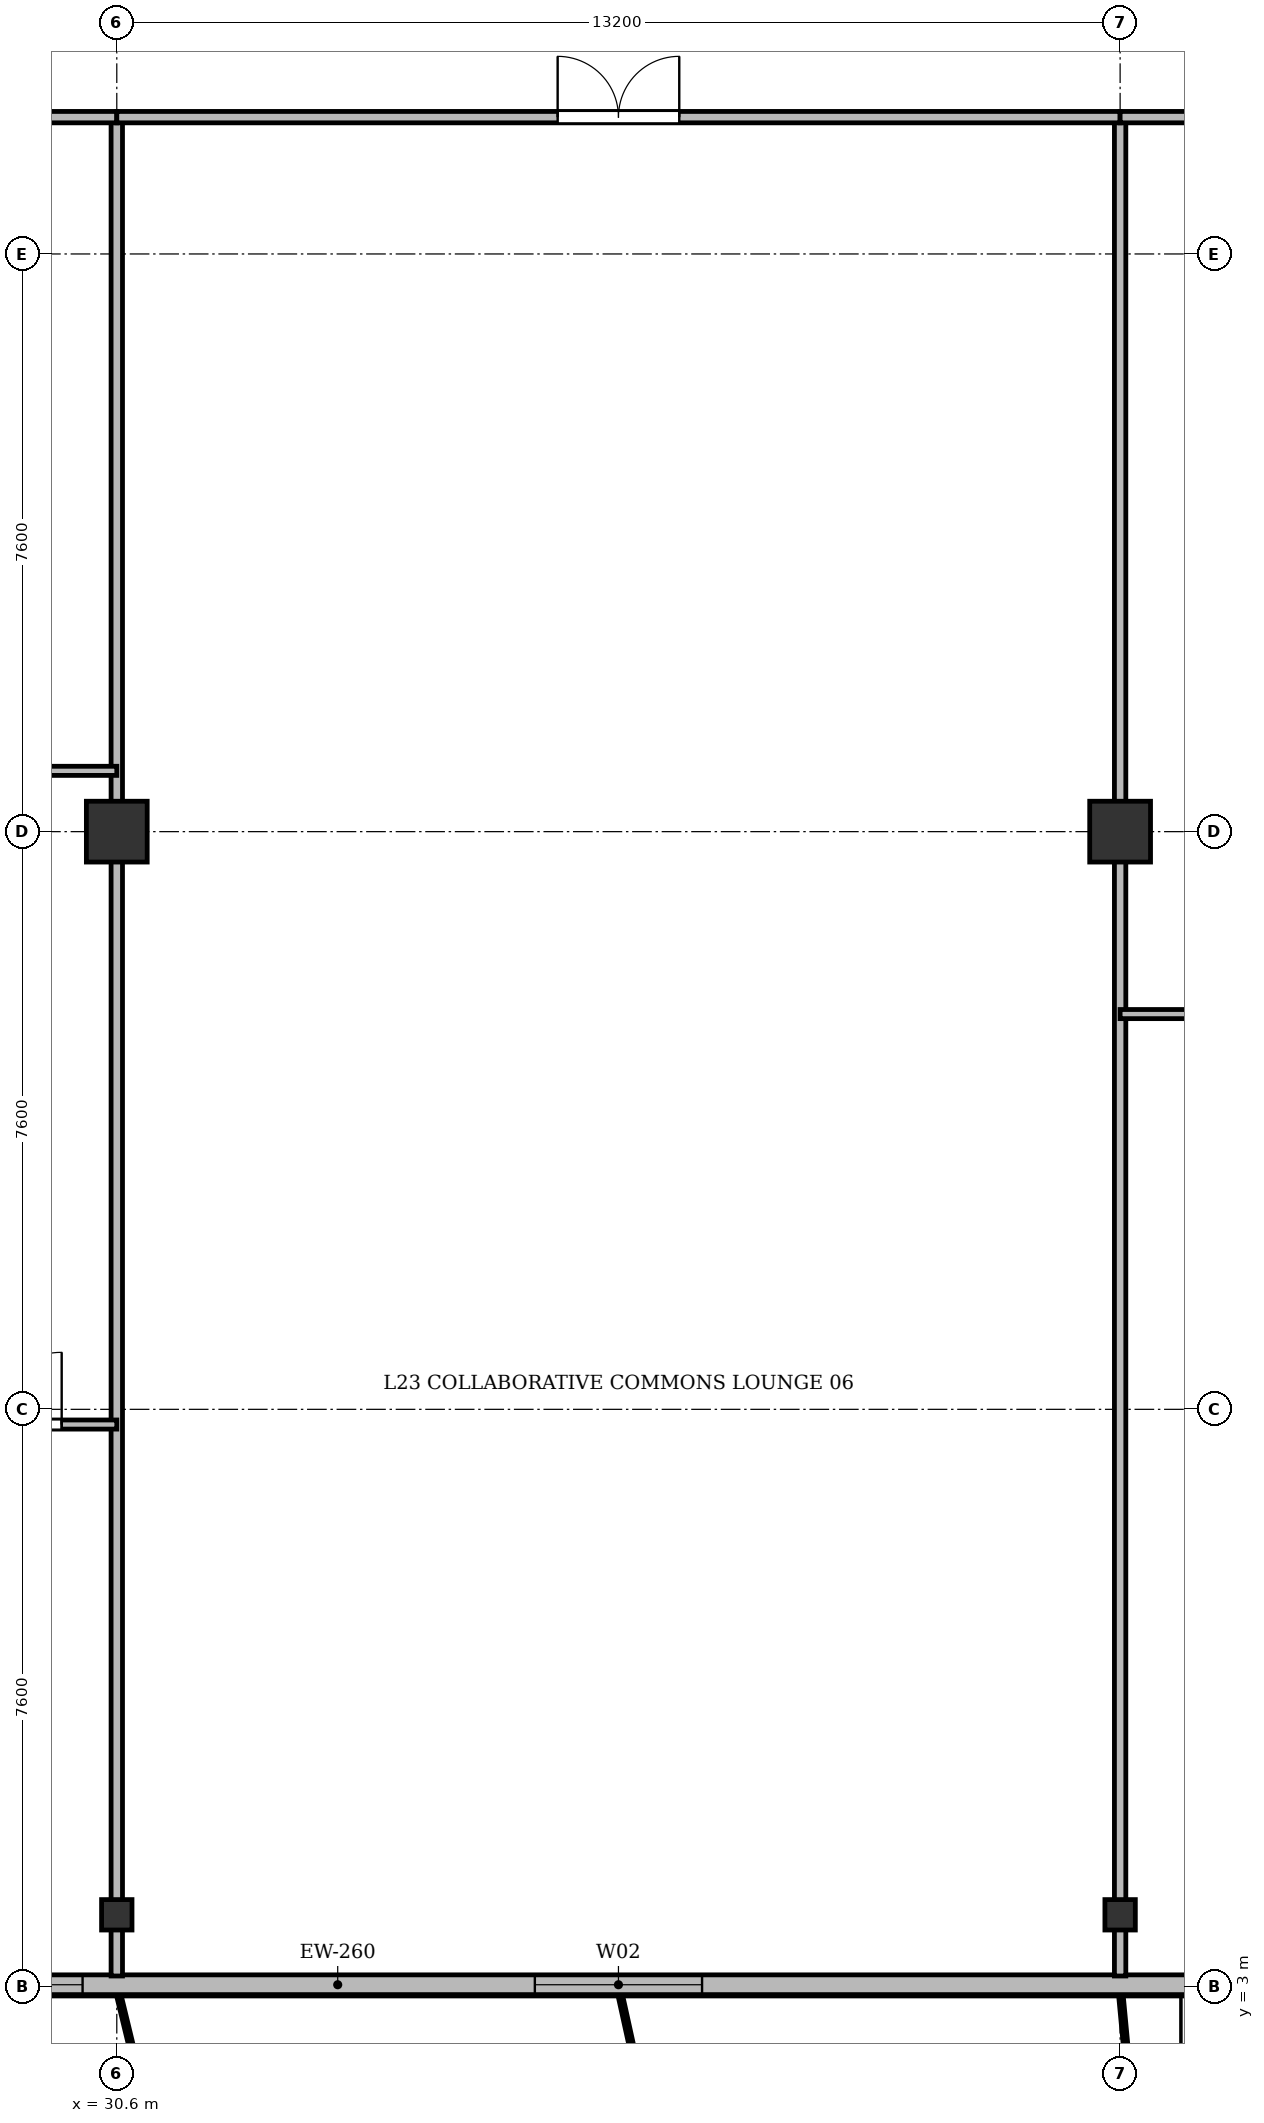
"""IFC4 building model, lengths in metres.
Left out: names, types, materials, properties, quantities, classifications, styles, units other than length and angle.
Written with IfcOpenShell. Run it as: python <this file> out.ifc"""

import sys

from ifc_helpers import new_model, si_unit, direction, frame, frame_2d, origin, origin_2d, place, context, subcontext, project, spatial, rectangle, i_section, extrude, source, transform, mapped, element, fill, save


model = new_model("IFC4")
c1 = context("Model", 3, precision=1e-05, world=origin(), true_north=direction((0.0, 1.0)))
c2 = subcontext(c1, "Body", "Model", "MODEL_VIEW")
j1 = project(units=[si_unit("LENGTHUNIT", "METRE"), si_unit("PLANEANGLEUNIT", "RADIAN")], contexts=[c1])
p1 = place(None, origin())
s1 = spatial("IfcSite", under=j1, at=p1, CompositionType="ELEMENT")
p2 = place(p1, origin())
s2 = spatial("IfcBuilding", under=s1, at=p2, CompositionType="ELEMENT")
p3 = place(p2, frame((0.0, 0.0, 92.5)))
s3 = spatial("IfcBuildingStorey", under=s2, at=p3, CompositionType="ELEMENT", Elevation=92.5)
m1 = source(origin(), c2, "Body", "SweptSolid", [
    extrude(i_section(OverallWidth=0.4, OverallDepth=0.4, WebThickness=0.022, FlangeThickness=0.035, at=origin_2d()), origin(), (0.0, 0.0, 1.0), 3.6),
])
p4 = place(p3, frame((30.6, 3.95, 0.0), z_axis=(0.0, 0.0, 1.0), x_axis=(1.0, 0.0, 0.0)))
e1 = element("IfcColumn", 1, at=p4, inside=s3, PredefinedType="COLUMN", context=c2, shape_type="MappedRepresentation", body=[
    mapped(m1, transform((0.0, 0.0, 0.0), x_axis=(1.0, 0.0, 0.0), y_axis=(0.0, 1.0, 0.0), z_axis=(0.0, 0.0, 1.0), scale=1.0)),
])
m2 = source(origin(), c2, "Body", "SweptSolid", [
    extrude(rectangle(XDim=0.8, YDim=0.8, at=origin_2d()), origin(), (0.0, 0.0, 1.0), 3.6),
])
p5 = place(p3, frame((30.6, 18.2, 0.0), z_axis=(0.0, 0.0, 1.0), x_axis=(1.0, 0.0, 0.0)))
e2 = element("IfcColumn", 2, at=p5, inside=s3, PredefinedType="COLUMN", context=c2, shape_type="MappedRepresentation", body=[
    mapped(m2, transform((0.0, 0.0, 0.0), x_axis=(1.0, 0.0, 0.0), y_axis=(0.0, 1.0, 0.0), z_axis=(0.0, 0.0, 1.0), scale=1.0)),
])
p6 = place(p3, frame((43.8, 3.95, 0.0), z_axis=(0.0, 0.0, 1.0), x_axis=(1.0, 0.0, 0.0)))
e3 = element("IfcColumn", 3, at=p6, inside=s3, PredefinedType="COLUMN", context=c2, shape_type="MappedRepresentation", body=[
    mapped(m1, transform((0.0, 0.0, 0.0), x_axis=(1.0, 0.0, 0.0), y_axis=(0.0, 1.0, 0.0), z_axis=(0.0, 0.0, 1.0), scale=1.0)),
])
p7 = place(p3, frame((43.8, 18.2, 0.0), z_axis=(0.0, 0.0, 1.0), x_axis=(1.0, 0.0, 0.0)))
e4 = element("IfcColumn", 4, at=p7, inside=s3, PredefinedType="COLUMN", context=c2, shape_type="MappedRepresentation", body=[
    mapped(m2, transform((0.0, 0.0, 0.0), x_axis=(1.0, 0.0, 0.0), y_axis=(0.0, 1.0, 0.0), z_axis=(0.0, 0.0, 1.0), scale=1.0)),
])
p8 = place(p3, frame((66.9, 3.03, 0.0), z_axis=(0.0, 0.0, 1.0), x_axis=(-1.0, 0.0, 0.0)))
e5 = element("IfcWall", 5, at=p8, inside=s3, PredefinedType="SOLIDWALL", context=c2, shape_type="SweptSolid", body=[
    extrude(rectangle(XDim=59.4, YDim=0.26, at=frame_2d((29.7, 0.0))), origin(), (0.0, 0.0, 1.0), 3.34),
])
p9 = place(p8, frame((2.175, 0.0, 0.9)))
e6 = element("IfcOpeningElement", 6, at=p9, cuts=e5, PredefinedType="OPENING", context=c2, shape_type="SweptSolid", body=[
    extrude(rectangle(XDim=1.65, YDim=1.85, at=frame_2d((0.825, 0.925))), frame((0.0, 0.14, 0.0), z_axis=(0.0, -1.0, 0.0), x_axis=(1.0, 0.0, 0.0)), (0.0, 0.0, 1.0), 0.28),
])
p10 = place(p8, frame((5.5, 0.0, 0.9)))
e7 = element("IfcOpeningElement", 7, at=p10, cuts=e5, PredefinedType="OPENING", context=c2, shape_type="SweptSolid", body=[
    extrude(rectangle(XDim=1.8, YDim=1.8, at=frame_2d((0.9, 0.9))), frame((0.0, 0.14, 0.0), z_axis=(0.0, -1.0, 0.0), x_axis=(1.0, 0.0, 0.0)), (0.0, 0.0, 1.0), 0.28),
])
p11 = place(p8, frame((8.65, 0.0, 0.9)))
e8 = element("IfcOpeningElement", 8, at=p11, cuts=e5, PredefinedType="OPENING", context=c2, shape_type="SweptSolid", body=[
    extrude(rectangle(XDim=1.5, YDim=1.75, at=frame_2d((0.75, 0.875))), frame((0.0, 0.14, 0.0), z_axis=(0.0, -1.0, 0.0), x_axis=(1.0, 0.0, 0.0)), (0.0, 0.0, 1.0), 0.28),
])
p12 = place(p8, frame((11.25, 0.0, 0.9)))
e9 = element("IfcOpeningElement", 9, at=p12, cuts=e5, PredefinedType="OPENING", context=c2, shape_type="SweptSolid", body=[
    extrude(rectangle(XDim=1.5, YDim=1.75, at=frame_2d((0.75, 0.875))), frame((0.0, 0.14, 0.0), z_axis=(0.0, -1.0, 0.0), x_axis=(1.0, 0.0, 0.0)), (0.0, 0.0, 1.0), 0.28),
])
p13 = place(p8, frame((13.6, 0.0, 0.9)))
e10 = element("IfcOpeningElement", 10, at=p13, cuts=e5, PredefinedType="OPENING", context=c2, shape_type="SweptSolid", body=[
    extrude(rectangle(XDim=2.0, YDim=1.95, at=frame_2d((1.0, 0.975))), frame((0.0, 0.14, 0.0), z_axis=(0.0, -1.0, 0.0), x_axis=(1.0, 0.0, 0.0)), (0.0, 0.0, 1.0), 0.28),
])
p14 = place(p8, frame((16.775, 0.0, 0.9)))
e11 = element("IfcOpeningElement", 11, at=p14, cuts=e5, PredefinedType="OPENING", context=c2, shape_type="SweptSolid", body=[
    extrude(rectangle(XDim=1.65, YDim=1.85, at=frame_2d((0.825, 0.925))), frame((0.0, 0.14, 0.0), z_axis=(0.0, -1.0, 0.0), x_axis=(1.0, 0.0, 0.0)), (0.0, 0.0, 1.0), 0.28),
])
p15 = place(p8, frame((20.227, 0.0, 0.0)))
e12 = element("IfcOpeningElement", 12, at=p15, cuts=e5, PredefinedType="OPENING", context=c2, shape_type="SweptSolid", body=[
    extrude(rectangle(XDim=1.2, YDim=2.2, at=frame_2d((0.6, 1.1))), frame((0.0, 0.14, 0.0), z_axis=(0.0, -1.0, 0.0), x_axis=(1.0, 0.0, 0.0)), (0.0, 0.0, 1.0), 0.28),
])
p16 = place(p8, frame((28.6, 0.0, 0.9)))
e13 = element("IfcOpeningElement", 13, at=p16, cuts=e5, PredefinedType="OPENING", context=c2, shape_type="SweptSolid", body=[
    extrude(rectangle(XDim=2.2, YDim=1.8, at=frame_2d((1.1, 0.9))), frame((0.0, 0.14, 0.0), z_axis=(0.0, -1.0, 0.0), x_axis=(1.0, 0.0, 0.0)), (0.0, 0.0, 1.0), 0.28),
])
p17 = place(p8, frame((36.75, 0.0, 0.9)))
e14 = element("IfcOpeningElement", 14, at=p17, cuts=e5, PredefinedType="OPENING", context=c2, shape_type="SweptSolid", body=[
    extrude(rectangle(XDim=1.5, YDim=1.75, at=frame_2d((0.75, 0.875))), frame((0.0, 0.14, 0.0), z_axis=(0.0, -1.0, 0.0), x_axis=(1.0, 0.0, 0.0)), (0.0, 0.0, 1.0), 0.28),
])
p18 = place(p8, frame((39.15, 0.0, 0.9)))
e15 = element("IfcOpeningElement", 15, at=p18, cuts=e5, PredefinedType="OPENING", context=c2, shape_type="SweptSolid", body=[
    extrude(rectangle(XDim=1.5, YDim=1.75, at=frame_2d((0.75, 0.875))), frame((0.0, 0.14, 0.0), z_axis=(0.0, -1.0, 0.0), x_axis=(1.0, 0.0, 0.0)), (0.0, 0.0, 1.0), 0.28),
])
p19 = place(p8, frame((41.475, 0.0, 0.9)))
e16 = element("IfcOpeningElement", 16, at=p19, cuts=e5, PredefinedType="OPENING", context=c2, shape_type="SweptSolid", body=[
    extrude(rectangle(XDim=1.65, YDim=1.85, at=frame_2d((0.825, 0.925))), frame((0.0, 0.14, 0.0), z_axis=(0.0, -1.0, 0.0), x_axis=(1.0, 0.0, 0.0)), (0.0, 0.0, 1.0), 0.28),
])
p20 = place(p8, frame((45.36, 0.0, 0.0)))
e17 = element("IfcOpeningElement", 17, at=p20, cuts=e5, PredefinedType="OPENING", context=c2, shape_type="SweptSolid", body=[
    extrude(rectangle(XDim=1.2, YDim=2.2, at=frame_2d((0.6, 1.1))), frame((0.0, 0.14, 0.0), z_axis=(0.0, -1.0, 0.0), x_axis=(1.0, 0.0, 0.0)), (0.0, 0.0, 1.0), 0.28),
])
p21 = place(p8, frame((48.2, 0.0, 0.9)))
e18 = element("IfcOpeningElement", 18, at=p21, cuts=e5, PredefinedType="OPENING", context=c2, shape_type="SweptSolid", body=[
    extrude(rectangle(XDim=2.2, YDim=1.8, at=frame_2d((1.1, 0.9))), frame((0.0, 0.14, 0.0), z_axis=(0.0, -1.0, 0.0), x_axis=(1.0, 0.0, 0.0)), (0.0, 0.0, 1.0), 0.28),
])
p22 = place(p8, frame((52.25, 0.0, 0.9)))
e19 = element("IfcOpeningElement", 19, at=p22, cuts=e5, PredefinedType="OPENING", context=c2, shape_type="SweptSolid", body=[
    extrude(rectangle(XDim=1.5, YDim=1.75, at=frame_2d((0.75, 0.875))), frame((0.0, 0.14, 0.0), z_axis=(0.0, -1.0, 0.0), x_axis=(1.0, 0.0, 0.0)), (0.0, 0.0, 1.0), 0.28),
])
p23 = place(p8, frame((55.4, 0.0, 0.9)))
e20 = element("IfcOpeningElement", 20, at=p23, cuts=e5, PredefinedType="OPENING", context=c2, shape_type="SweptSolid", body=[
    extrude(rectangle(XDim=2.0, YDim=1.95, at=frame_2d((1.0, 0.975))), frame((0.0, 0.14, 0.0), z_axis=(0.0, -1.0, 0.0), x_axis=(1.0, 0.0, 0.0)), (0.0, 0.0, 1.0), 0.28),
])
for number, where, z_axis, x_axis in (
    (21, (30.6, 3.145, 0.0), (0.0, 0.0, 1.0), (0.0, 1.0, 0.0)),
    (22, (43.8, 3.145, 0.0), (0.0, 0.0, 1.0), (0.0, 1.0, 0.0)),
):
    element("IfcWall", number, at=place(p3, frame(where, z_axis=z_axis, x_axis=x_axis)), inside=s3, PredefinedType="PARTITIONING", context=c2, shape_type="SweptSolid", body=[
        extrude(rectangle(XDim=24.455, YDim=0.15, at=frame_2d((12.228, 0.0))), origin(), (0.0, 0.0, 1.0), 2.84),
    ])
p24 = place(p3, frame((23.4, 19.0, 0.0), z_axis=(0.0, 0.0, 1.0), x_axis=(1.0, 0.0, 0.0)))
e23 = element("IfcWall", 23, at=p24, inside=s3, PredefinedType="PARTITIONING", context=c2, shape_type="SweptSolid", body=[
    extrude(rectangle(XDim=7.2, YDim=0.12, at=frame_2d((3.6, 0.0))), origin(), (0.0, 0.0, 1.0), 2.84),
])
p25 = place(p24, frame((3.125, 0.0, 0.0)))
e24 = element("IfcOpeningElement", 24, at=p25, cuts=e23, PredefinedType="OPENING", context=c2, shape_type="SweptSolid", body=[
    extrude(rectangle(XDim=0.95, YDim=2.15, at=frame_2d((0.475, 1.075))), frame((0.0, 0.07, 0.0), z_axis=(0.0, -1.0, 0.0), x_axis=(1.0, 0.0, 0.0)), (0.0, 0.0, 1.0), 0.14),
])
p26 = place(p3, frame((23.4, 27.6, 0.0), z_axis=(0.0, 0.0, 1.0), x_axis=(1.0, 0.0, 0.0)))
e25 = element("IfcWall", 25, at=p26, inside=s3, PredefinedType="PARTITIONING", context=c2, shape_type="SweptSolid", body=[
    extrude(rectangle(XDim=7.2, YDim=0.15, at=frame_2d((3.6, 0.0))), origin(), (0.0, 0.0, 1.0), 2.84),
])
p27 = place(p26, frame((4.706, 0.0, 0.0)))
e26 = element("IfcOpeningElement", 26, at=p27, cuts=e25, PredefinedType="OPENING", context=c2, shape_type="SweptSolid", body=[
    extrude(rectangle(XDim=0.95, YDim=2.15, at=frame_2d((0.475, 1.075))), frame((0.0, 0.085, 0.0), z_axis=(0.0, -1.0, 0.0), x_axis=(1.0, 0.0, 0.0)), (0.0, 0.0, 1.0), 0.17),
])
p28 = place(p3, frame((28.2, 10.4, 0.0), z_axis=(0.0, 0.0, 1.0), x_axis=(1.0, 0.0, 0.0)))
e27 = element("IfcWall", 27, at=p28, inside=s3, PredefinedType="PARTITIONING", context=c2, shape_type="SweptSolid", body=[
    extrude(rectangle(XDim=2.4, YDim=0.12, at=frame_2d((1.2, 0.0))), origin(), (0.0, 0.0, 1.0), 2.84),
])
p29 = place(p28, frame((0.725, 0.0, 0.0)))
e28 = element("IfcOpeningElement", 28, at=p29, cuts=e27, PredefinedType="OPENING", context=c2, shape_type="SweptSolid", body=[
    extrude(rectangle(XDim=0.95, YDim=2.15, at=frame_2d((0.475, 1.075))), frame((0.0, 0.07, 0.0), z_axis=(0.0, -1.0, 0.0), x_axis=(1.0, 0.0, 0.0)), (0.0, 0.0, 1.0), 0.14),
])
p30 = place(p3, frame((30.6, 27.6, 0.0), z_axis=(0.0, 0.0, 1.0), x_axis=(1.0, 0.0, 0.0)))
e29 = element("IfcWall", 29, at=p30, inside=s3, PredefinedType="PARTITIONING", context=c2, shape_type="SweptSolid", body=[
    extrude(rectangle(XDim=13.2, YDim=0.15, at=frame_2d((6.6, 0.0))), origin(), (0.0, 0.0, 1.0), 2.84),
])
p31 = place(p30, frame((5.8, 0.0, 0.0)))
e30 = element("IfcOpeningElement", 30, at=p31, cuts=e29, PredefinedType="OPENING", context=c2, shape_type="SweptSolid", body=[
    extrude(rectangle(XDim=1.6, YDim=2.2, at=frame_2d((0.8, 1.1))), frame((0.0, 0.085, 0.0), z_axis=(0.0, -1.0, 0.0), x_axis=(1.0, 0.0, 0.0)), (0.0, 0.0, 1.0), 0.17),
])
p32 = place(p3, frame((43.8, 27.6, 0.0), z_axis=(0.0, 0.0, 1.0), x_axis=(1.0, 0.0, 0.0)))
e31 = element("IfcWall", 31, at=p32, inside=s3, PredefinedType="PARTITIONING", context=c2, shape_type="SweptSolid", body=[
    extrude(rectangle(XDim=3.8, YDim=0.15, at=frame_2d((1.9, 0.0))), origin(), (0.0, 0.0, 1.0), 2.84),
])
p33 = place(p32, frame((1.33, 0.0, 0.0)))
e32 = element("IfcOpeningElement", 32, at=p33, cuts=e31, PredefinedType="OPENING", context=c2, shape_type="SweptSolid", body=[
    extrude(rectangle(XDim=0.95, YDim=2.15, at=frame_2d((0.475, 1.075))), frame((0.0, 0.085, 0.0), z_axis=(0.0, -1.0, 0.0), x_axis=(1.0, 0.0, 0.0)), (0.0, 0.0, 1.0), 0.17),
])
p34 = place(p3, frame((43.8, 15.8, 0.0), z_axis=(0.0, 0.0, 1.0), x_axis=(1.0, 0.0, 0.0)))
e33 = element("IfcWall", 33, at=p34, inside=s3, PredefinedType="PARTITIONING", context=c2, shape_type="SweptSolid", body=[
    extrude(rectangle(XDim=3.8, YDim=0.12, at=frame_2d((1.9, 0.0))), origin(), (0.0, 0.0, 1.0), 2.84),
])
p35 = place(p34, frame((1.33, 0.0, 0.0)))
e34 = element("IfcOpeningElement", 34, at=p35, cuts=e33, PredefinedType="OPENING", context=c2, shape_type="SweptSolid", body=[
    extrude(rectangle(XDim=0.95, YDim=2.15, at=frame_2d((0.475, 1.075))), frame((0.0, 0.07, 0.0), z_axis=(0.0, -1.0, 0.0), x_axis=(1.0, 0.0, 0.0)), (0.0, 0.0, 1.0), 0.14),
])
m3 = source(origin(), c2, "Body", "SweptSolid", [
    extrude(rectangle(XDim=2.2, YDim=1.8, at=frame_2d((1.1, 0.9))), frame((0.0, 0.03, 0.0), z_axis=(0.0, -1.0, 0.0), x_axis=(1.0, 0.0, 0.0)), (0.0, 0.0, 1.0), 0.06),
])
p36 = place(p16, origin())
e35 = element("IfcWindow", 35, at=p36, inside=s3, PartitioningType="SINGLE_PANEL", PredefinedType="WINDOW", context=c2, shape_type="MappedRepresentation", body=[
    mapped(m3, transform((0.0, 0.0, 0.0), x_axis=(1.0, 0.0, 0.0), y_axis=(0.0, 1.0, 0.0), z_axis=(0.0, 0.0, 1.0), scale=1.0)),
])
fill(e13, e35)
m4 = source(origin(), c2, "Body", "SweptSolid", [
    extrude(rectangle(XDim=1.5, YDim=1.75, at=frame_2d((0.75, 0.875))), frame((0.0, 0.03, 0.0), z_axis=(0.0, -1.0, 0.0), x_axis=(1.0, 0.0, 0.0)), (0.0, 0.0, 1.0), 0.06),
])
p37 = place(p17, origin())
e36 = element("IfcWindow", 36, at=p37, inside=s3, PartitioningType="SINGLE_PANEL", PredefinedType="WINDOW", context=c2, shape_type="MappedRepresentation", body=[
    mapped(m4, transform((0.0, 0.0, 0.0), x_axis=(1.0, 0.0, 0.0), y_axis=(0.0, 1.0, 0.0), z_axis=(0.0, 0.0, 1.0), scale=1.0)),
])
fill(e14, e36)
m5 = source(origin(), c2, "Body", "SweptSolid", [
    extrude(rectangle(XDim=0.95, YDim=2.15, at=frame_2d((0.475, 1.075))), frame((0.0, 0.025, 0.0), z_axis=(0.0, -1.0, 0.0), x_axis=(1.0, 0.0, 0.0)), (0.0, 0.0, 1.0), 0.05),
])
p38 = place(p29, origin())
e37 = element("IfcDoor", 37, at=p38, inside=s3, OperationType="SINGLE_SWING_RIGHT", PredefinedType="DOOR", context=c2, shape_type="MappedRepresentation", body=[
    mapped(m5, transform((0.0, 0.0, 0.0), x_axis=(1.0, 0.0, 0.0), y_axis=(0.0, 1.0, 0.0), z_axis=(0.0, 0.0, 1.0), scale=1.0)),
])
fill(e28, e37)
m6 = source(origin(), c2, "Body", "SweptSolid", [
    extrude(rectangle(XDim=1.6, YDim=2.2, at=frame_2d((0.8, 1.1))), frame((0.0, 0.025, 0.0), z_axis=(0.0, -1.0, 0.0), x_axis=(1.0, 0.0, 0.0)), (0.0, 0.0, 1.0), 0.05),
])
p39 = place(p31, origin())
e38 = element("IfcDoor", 38, at=p39, inside=s3, OperationType="DOUBLE_DOOR_SINGLE_SWING", PredefinedType="DOOR", context=c2, shape_type="MappedRepresentation", body=[
    mapped(m6, transform((0.0, 0.0, 0.0), x_axis=(1.0, 0.0, 0.0), y_axis=(0.0, 1.0, 0.0), z_axis=(0.0, 0.0, 1.0), scale=1.0)),
])
fill(e30, e38)
save(model, sys.argv[1])
